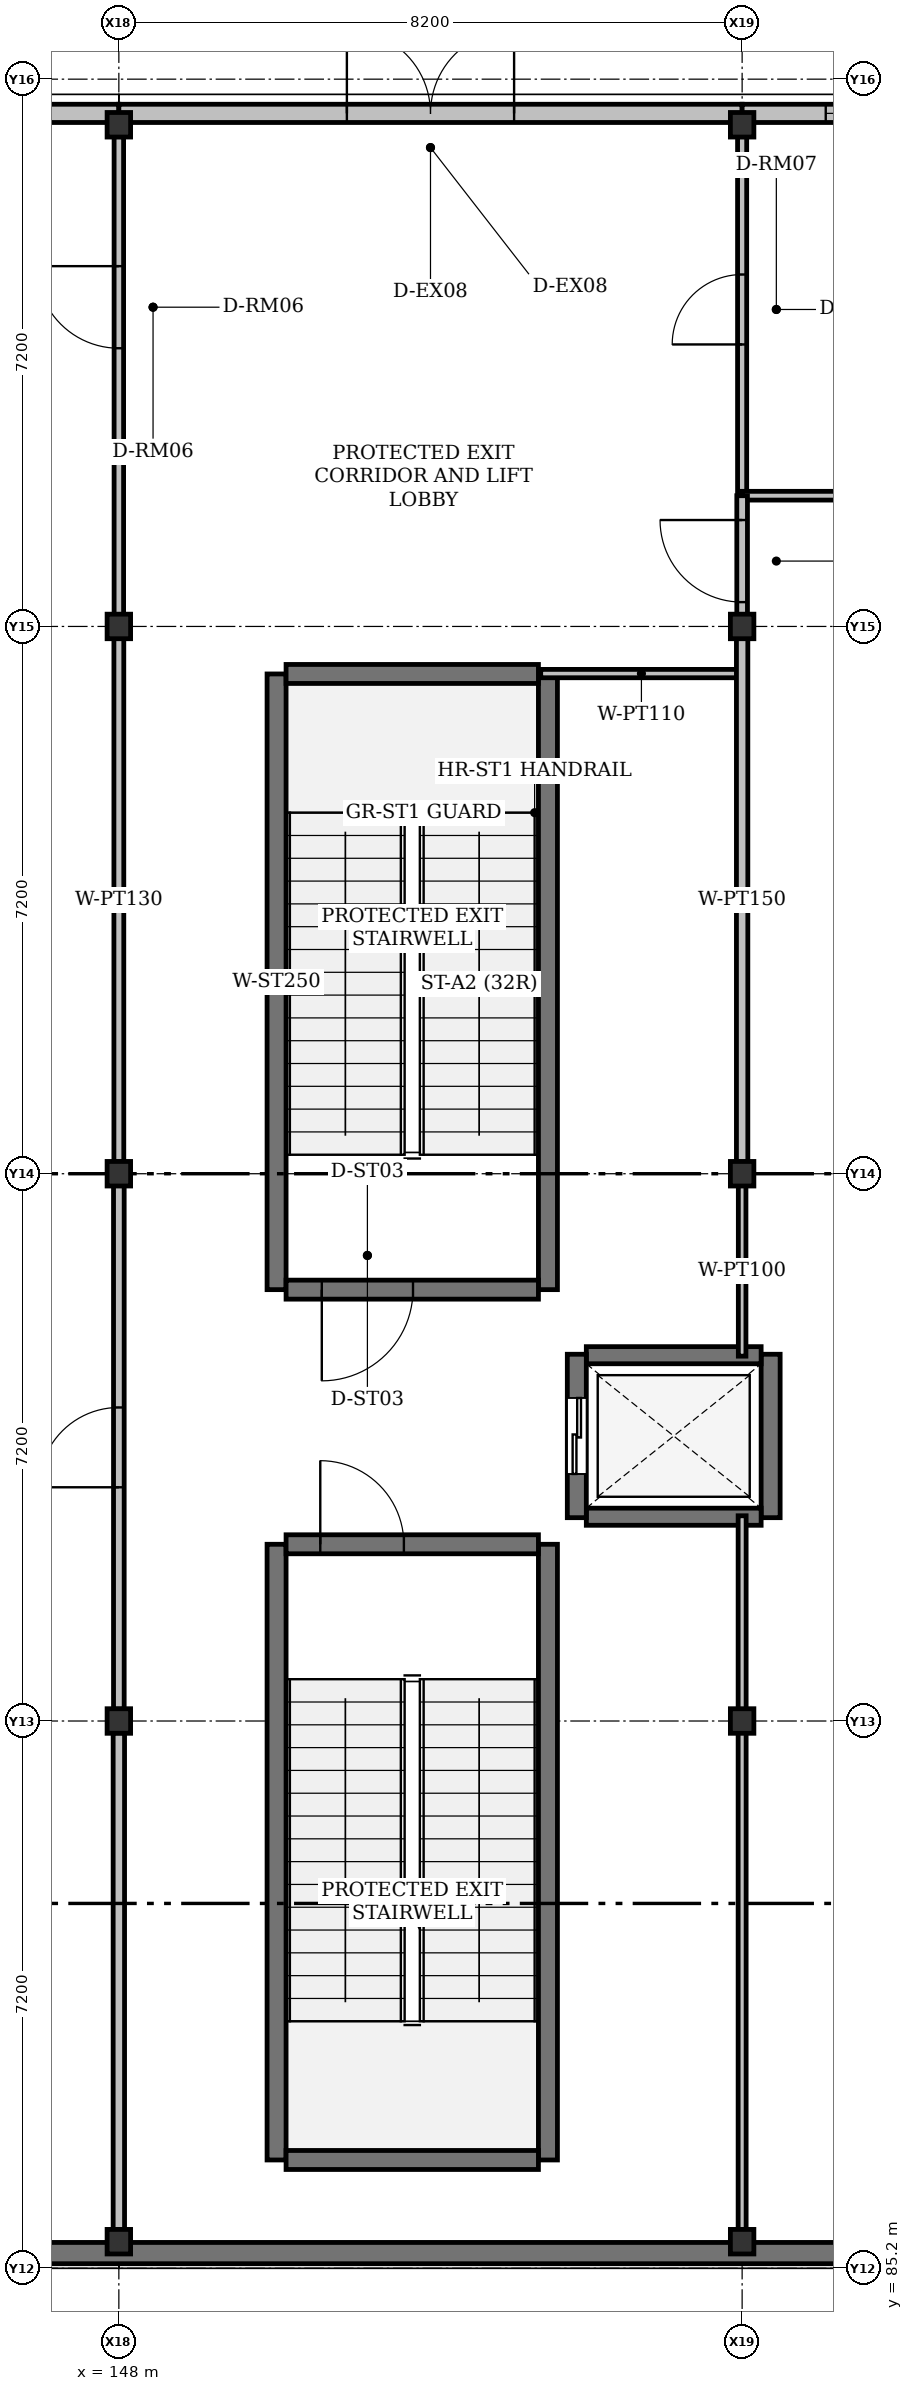
"""IFC4 building model, lengths in metres.
Left out: names, types, materials, properties, quantities, classifications, styles, units other than length and angle.
Written with IfcOpenShell. Run it as: python <this file> out.ifc"""

import sys

from ifc_helpers import new_model, si_unit, direction, frame, frame_2d, origin, origin_2d, place, context, subcontext, project, spatial, rectangle, i_section, extrude, element, fill, save


model = new_model("IFC4")
c1 = context("Model", 3, precision=1e-05, world=origin(), true_north=direction((0.0, 1.0)))
c2 = subcontext(c1, "Body", "Model", "MODEL_VIEW")
j1 = project(units=[si_unit("LENGTHUNIT", "METRE"), si_unit("PLANEANGLEUNIT", "RADIAN")], contexts=[c1])
p1 = place(None, origin())
s1 = spatial("IfcSite", under=j1, at=p1, CompositionType="ELEMENT")
p2 = place(p1, origin())
s2 = spatial("IfcBuilding", under=s1, at=p2, CompositionType="ELEMENT")
p3 = place(p2, origin())
s3 = spatial("IfcBuildingStorey", under=s2, at=p3, CompositionType="ELEMENT", Elevation=0.0)
for number, where, z_axis, x_axis in (
    (1, (148.0, 85.55, 0.0), (0.0, 0.0, 1.0), (1.0, 0.0, 0.0)),
    (2, (148.0, 92.4, 0.0), (0.0, 0.0, 1.0), (1.0, 0.0, 0.0)),
    (3, (148.0, 99.6, 0.0), (0.0, 0.0, 1.0), (1.0, 0.0, 0.0)),
    (4, (148.0, 106.8, 0.0), (0.0, 0.0, 1.0), (1.0, 0.0, 0.0)),
    (5, (148.0, 113.4, 0.0), (0.0, 0.0, 1.0), (1.0, 0.0, 0.0)),
    (6, (156.2, 85.55, 0.0), (0.0, 0.0, 1.0), (1.0, 0.0, 0.0)),
    (7, (156.2, 92.4, 0.0), (0.0, 0.0, 1.0), (1.0, 0.0, 0.0)),
    (8, (156.2, 99.6, 0.0), (0.0, 0.0, 1.0), (1.0, 0.0, 0.0)),
    (9, (156.2, 106.8, 0.0), (0.0, 0.0, 1.0), (1.0, 0.0, 0.0)),
    (10, (156.2, 113.4, 0.0), (0.0, 0.0, 1.0), (1.0, 0.0, 0.0)),
):
    element("IfcColumn", number, at=place(p3, frame(where, z_axis=z_axis, x_axis=x_axis)), inside=s3, PredefinedType="COLUMN", context=c2, shape_type="SweptSolid", body=[
        extrude(i_section(OverallWidth=0.309, OverallDepth=0.323, WebThickness=0.014, FlangeThickness=0.023, FilletRadius=0.015, at=origin_2d()), origin(), (0.0, 0.0, 1.0), 5.4),
    ])
p4 = place(p3, frame((163.85, 85.4, 0.0), z_axis=(0.0, 0.0, 1.0), x_axis=(-1.0, 0.0, 0.0)))
e11 = element("IfcWall", 11, at=p4, inside=s3, PredefinedType="SOLIDWALL", context=c2, shape_type="SweptSolid", body=[
    extrude(rectangle(XDim=40.25, YDim=0.28, at=frame_2d((20.125, 0.0))), origin(), (0.0, 0.0, 1.0), 5.19),
])
p5 = place(p3, frame((139.8, 113.55, 0.0), z_axis=(0.0, 0.0, 1.0), x_axis=(1.0, 0.0, 0.0)))
e12 = element("IfcWall", 12, at=p5, inside=s3, PredefinedType="SOLIDWALL", context=c2, shape_type="SweptSolid", body=[
    extrude(rectangle(XDim=8.2, YDim=0.24, at=frame_2d((4.1, 0.0))), origin(), (0.0, 0.0, 1.0), 4.7),
])
p6 = place(p5, frame((1.1, 0.0, 0.92)))
e13 = element("IfcOpeningElement", 13, at=p6, cuts=e12, PredefinedType="OPENING", context=c2, shape_type="SweptSolid", body=[
    extrude(rectangle(XDim=1.2, YDim=1.55, at=frame_2d((0.6, 0.775))), frame((0.0, 0.12, 0.0), z_axis=(0.0, -1.0, 0.0), x_axis=(1.0, 0.0, 0.0)), (0.0, 0.0, 1.0), 0.24),
])
p7 = place(p5, frame((5.3, 0.0, 0.92)))
e14 = element("IfcOpeningElement", 14, at=p7, cuts=e12, PredefinedType="OPENING", context=c2, shape_type="SweptSolid", body=[
    extrude(rectangle(XDim=1.8, YDim=1.7, at=frame_2d((0.9, 0.85))), frame((0.0, 0.12, 0.0), z_axis=(0.0, -1.0, 0.0), x_axis=(1.0, 0.0, 0.0)), (0.0, 0.0, 1.0), 0.24),
])
p8 = place(p3, frame((148.0, 113.55, 0.0), z_axis=(0.0, 0.0, 1.0), x_axis=(1.0, 0.0, 0.0)))
e15 = element("IfcWall", 15, at=p8, inside=s3, PredefinedType="SOLIDWALL", context=c2, shape_type="SweptSolid", body=[
    extrude(rectangle(XDim=8.2, YDim=0.24, at=frame_2d((4.1, 0.0))), origin(), (0.0, 0.0, 1.0), 4.7),
])
p9 = place(p8, frame((3.0, 0.0, 0.0)))
e16 = element("IfcOpeningElement", 16, at=p9, cuts=e15, PredefinedType="OPENING", context=c2, shape_type="SweptSolid", body=[
    extrude(rectangle(XDim=2.2, YDim=2.4, at=frame_2d((1.1, 1.2))), frame((0.0, 0.12, 0.0), z_axis=(0.0, -1.0, 0.0), x_axis=(1.0, 0.0, 0.0)), (0.0, 0.0, 1.0), 0.24),
])
p10 = place(p3, frame((156.2, 113.55, 0.0), z_axis=(0.0, 0.0, 1.0), x_axis=(1.0, 0.0, 0.0)))
e17 = element("IfcWall", 17, at=p10, inside=s3, PredefinedType="SOLIDWALL", context=c2, shape_type="SweptSolid", body=[
    extrude(rectangle(XDim=7.65, YDim=0.24, at=frame_2d((3.825, 0.0))), origin(), (0.0, 0.0, 1.0), 4.7),
])
p11 = place(p10, frame((1.1, 0.0, 0.92)))
e18 = element("IfcOpeningElement", 18, at=p11, cuts=e17, PredefinedType="OPENING", context=c2, shape_type="SweptSolid", body=[
    extrude(rectangle(XDim=1.8, YDim=1.55, at=frame_2d((0.9, 0.775))), frame((0.0, 0.12, 0.0), z_axis=(0.0, -1.0, 0.0), x_axis=(1.0, 0.0, 0.0)), (0.0, 0.0, 1.0), 0.24),
])
p12 = place(p10, frame((4.15, 0.0, 0.92)))
e19 = element("IfcOpeningElement", 19, at=p12, cuts=e17, PredefinedType="OPENING", context=c2, shape_type="SweptSolid", body=[
    extrude(rectangle(XDim=2.4, YDim=1.7, at=frame_2d((1.2, 0.85))), frame((0.0, 0.12, 0.0), z_axis=(0.0, -1.0, 0.0), x_axis=(1.0, 0.0, 0.0)), (0.0, 0.0, 1.0), 0.24),
])
for number, where, z_axis, x_axis in (
    (20, (150.075, 86.625, 0.0), (0.0, 0.0, 1.0), (0.0, 1.0, 0.0)),
    (21, (153.645, 86.625, 0.0), (0.0, 0.0, 1.0), (0.0, 1.0, 0.0)),
):
    element("IfcWall", number, at=place(p3, frame(where, z_axis=z_axis, x_axis=x_axis)), inside=s3, PredefinedType="SHEAR", context=c2, shape_type="SweptSolid", body=[
        extrude(rectangle(XDim=8.1, YDim=0.25, at=frame_2d((4.05, 0.0))), origin(), (0.0, 0.0, 1.0), 5.4),
    ])
p13 = place(p3, frame((150.2, 86.625, 0.0), z_axis=(0.0, 0.0, 1.0), x_axis=(1.0, 0.0, 0.0)))
e22 = element("IfcWall", 22, at=p13, inside=s3, PredefinedType="SHEAR", context=c2, shape_type="SweptSolid", body=[
    extrude(rectangle(XDim=3.32, YDim=0.25, at=frame_2d((1.66, 0.0))), origin(), (0.0, 0.0, 1.0), 5.4),
])
p14 = place(p3, frame((150.2, 94.725, 0.0), z_axis=(0.0, 0.0, 1.0), x_axis=(1.0, 0.0, 0.0)))
e23 = element("IfcWall", 23, at=p14, inside=s3, PredefinedType="SHEAR", context=c2, shape_type="SweptSolid", body=[
    extrude(rectangle(XDim=3.32, YDim=0.25, at=frame_2d((1.66, 0.0))), origin(), (0.0, 0.0, 1.0), 5.4),
])
p15 = place(p14, frame((0.45, 0.0, 0.0)))
e24 = element("IfcOpeningElement", 24, at=p15, cuts=e23, PredefinedType="OPENING", context=c2, shape_type="SweptSolid", body=[
    extrude(rectangle(XDim=1.1, YDim=2.15, at=frame_2d((0.55, 1.075))), frame((0.0, 0.125, 0.0), z_axis=(0.0, -1.0, 0.0), x_axis=(1.0, 0.0, 0.0)), (0.0, 0.0, 1.0), 0.25),
])
for number, where, z_axis, x_axis in (
    (25, (150.075, 98.075, 0.0), (0.0, 0.0, 1.0), (0.0, 1.0, 0.0)),
    (26, (153.645, 98.075, 0.0), (0.0, 0.0, 1.0), (0.0, 1.0, 0.0)),
):
    element("IfcWall", number, at=place(p3, frame(where, z_axis=z_axis, x_axis=x_axis)), inside=s3, PredefinedType="SHEAR", context=c2, shape_type="SweptSolid", body=[
        extrude(rectangle(XDim=8.1, YDim=0.25, at=frame_2d((4.05, 0.0))), origin(), (0.0, 0.0, 1.0), 5.4),
    ])
p16 = place(p3, frame((150.2, 106.175, 0.0), z_axis=(0.0, 0.0, 1.0), x_axis=(1.0, 0.0, 0.0)))
e27 = element("IfcWall", 27, at=p16, inside=s3, PredefinedType="SHEAR", context=c2, shape_type="SweptSolid", body=[
    extrude(rectangle(XDim=3.32, YDim=0.25, at=frame_2d((1.66, 0.0))), origin(), (0.0, 0.0, 1.0), 5.4),
])
p17 = place(p3, frame((153.52, 98.075, 0.0), z_axis=(0.0, 0.0, 1.0), x_axis=(-1.0, 0.0, 0.0)))
e28 = element("IfcWall", 28, at=p17, inside=s3, PredefinedType="SHEAR", context=c2, shape_type="SweptSolid", body=[
    extrude(rectangle(XDim=3.32, YDim=0.25, at=frame_2d((1.66, 0.0))), origin(), (0.0, 0.0, 1.0), 5.4),
])
p18 = place(p17, frame((1.65, 0.0, 0.0)))
e29 = element("IfcOpeningElement", 29, at=p18, cuts=e28, PredefinedType="OPENING", context=c2, shape_type="SweptSolid", body=[
    extrude(rectangle(XDim=1.2, YDim=2.2, at=frame_2d((0.6, 1.1))), frame((0.0, 0.125, 0.0), z_axis=(0.0, -1.0, 0.0), x_axis=(1.0, 0.0, 0.0)), (0.0, 0.0, 1.0), 0.25),
])
p19 = place(p3, frame((156.575, 95.075, 0.0), z_axis=(0.0, 0.0, 1.0), x_axis=(0.0, 1.0, 0.0)))
e30 = element("IfcWall", 30, at=p19, inside=s3, PredefinedType="SHEAR", context=c2, shape_type="SweptSolid", body=[
    extrude(rectangle(XDim=2.15, YDim=0.25, at=frame_2d((1.075, 0.0))), origin(), (0.0, 0.0, 1.0), 5.4),
])
for number, where, z_axis, x_axis in (
    (31, (154.15, 95.087, 0.0), (0.0, 0.0, 1.0), (1.0, 0.0, 0.0)),
    (32, (154.15, 97.212, 0.0), (0.0, 0.0, 1.0), (1.0, 0.0, 0.0)),
):
    element("IfcWall", number, at=place(p3, frame(where, z_axis=z_axis, x_axis=x_axis)), inside=s3, PredefinedType="SHEAR", context=c2, shape_type="SweptSolid", body=[
        extrude(rectangle(XDim=2.3, YDim=0.225, at=frame_2d((1.15, 0.0))), origin(), (0.0, 0.0, 1.0), 5.4),
    ])
p20 = place(p3, frame((154.025, 95.075, 0.0), z_axis=(0.0, 0.0, 1.0), x_axis=(0.0, 1.0, 0.0)))
e33 = element("IfcWall", 33, at=p20, inside=s3, PredefinedType="SHEAR", context=c2, shape_type="SweptSolid", body=[
    extrude(rectangle(XDim=2.15, YDim=0.25, at=frame_2d((1.075, 0.0))), origin(), (0.0, 0.0, 1.0), 5.4),
])
p21 = place(p20, frame((0.575, 0.0, 0.0)))
e34 = element("IfcOpeningElement", 34, at=p21, cuts=e33, PredefinedType="OPENING", context=c2, shape_type="SweptSolid", body=[
    extrude(rectangle(XDim=1.0, YDim=2.1, at=frame_2d((0.5, 1.05))), frame((0.0, 0.125, 0.0), z_axis=(0.0, -1.0, 0.0), x_axis=(1.0, 0.0, 0.0)), (0.0, 0.0, 1.0), 0.25),
])
p22 = place(p3, frame((148.0, 85.707, 0.0), z_axis=(0.0, 0.0, 1.0), x_axis=(0.0, 1.0, 0.0)))
e35 = element("IfcWall", 35, at=p22, inside=s3, PredefinedType="PARTITIONING", context=c2, shape_type="SweptSolid", body=[
    extrude(rectangle(XDim=6.537, YDim=0.15, at=frame_2d((3.269, 0.0))), origin(), (0.0, 0.0, 1.0), 4.641),
])
p23 = place(p3, frame((148.0, 92.556, 0.0), z_axis=(0.0, 0.0, 1.0), x_axis=(0.0, 1.0, 0.0)))
e36 = element("IfcWall", 36, at=p23, inside=s3, PredefinedType="PARTITIONING", context=c2, shape_type="SweptSolid", body=[
    extrude(rectangle(XDim=6.887, YDim=0.14, at=frame_2d((3.444, 0.0))), origin(), (0.0, 0.0, 1.0), 4.641),
])
p24 = place(p23, frame((2.918, 0.0, 0.0)))
e37 = element("IfcOpeningElement", 37, at=p24, cuts=e36, PredefinedType="OPENING", context=c2, shape_type="SweptSolid", body=[
    extrude(rectangle(XDim=1.05, YDim=2.1, at=frame_2d((0.525, 1.05))), frame((0.0, 0.07, 0.0), z_axis=(0.0, -1.0, 0.0), x_axis=(1.0, 0.0, 0.0)), (0.0, 0.0, 1.0), 0.14),
])
p25 = place(p3, frame((148.0, 99.757, 0.0), z_axis=(0.0, 0.0, 1.0), x_axis=(0.0, 1.0, 0.0)))
e38 = element("IfcWall", 38, at=p25, inside=s3, PredefinedType="PARTITIONING", context=c2, shape_type="SweptSolid", body=[
    extrude(rectangle(XDim=6.887, YDim=0.13, at=frame_2d((3.443, 0.0))), origin(), (0.0, 0.0, 1.0), 4.641),
])
p26 = place(p3, frame((148.0, 106.957, 0.0), z_axis=(0.0, 0.0, 1.0), x_axis=(0.0, 1.0, 0.0)))
e39 = element("IfcWall", 39, at=p26, inside=s3, PredefinedType="PARTITIONING", context=c2, shape_type="SweptSolid", body=[
    extrude(rectangle(XDim=6.287, YDim=0.125, at=frame_2d((3.144, 0.0))), origin(), (0.0, 0.0, 1.0), 4.641),
])
p27 = place(p26, frame((3.503, 0.0, 0.0)))
e40 = element("IfcOpeningElement", 40, at=p27, cuts=e39, PredefinedType="OPENING", context=c2, shape_type="SweptSolid", body=[
    extrude(rectangle(XDim=1.08, YDim=2.1, at=frame_2d((0.54, 1.05))), frame((0.0, 0.062, 0.0), z_axis=(0.0, -1.0, 0.0), x_axis=(1.0, 0.0, 0.0)), (0.0, 0.0, 1.0), 0.125),
])
p28 = place(p3, frame((156.2, 108.52, 0.0), z_axis=(0.0, 0.0, 1.0), x_axis=(0.0, 1.0, 0.0)))
e41 = element("IfcWall", 41, at=p28, inside=s3, PredefinedType="PARTITIONING", context=c2, shape_type="SweptSolid", body=[
    extrude(rectangle(XDim=4.723, YDim=0.12, at=frame_2d((2.362, 0.0))), origin(), (0.0, 0.0, 1.0), 4.641),
])
p29 = place(p28, frame((1.99, 0.0, 0.0)))
e42 = element("IfcOpeningElement", 42, at=p29, cuts=e41, PredefinedType="OPENING", context=c2, shape_type="SweptSolid", body=[
    extrude(rectangle(XDim=0.92, YDim=2.15, at=frame_2d((0.46, 1.075))), frame((0.0, 0.06, 0.0), z_axis=(0.0, -1.0, 0.0), x_axis=(1.0, 0.0, 0.0)), (0.0, 0.0, 1.0), 0.12),
])
p30 = place(p3, frame((163.9, 108.52, 0.0), z_axis=(0.0, 0.0, 1.0), x_axis=(-1.0, 0.0, 0.0)))
e43 = element("IfcWall", 43, at=p30, inside=s3, PredefinedType="PARTITIONING", context=c2, shape_type="SweptSolid", body=[
    extrude(rectangle(XDim=7.7, YDim=0.115, at=frame_2d((3.85, 0.0))), origin(), (0.0, 0.0, 1.0), 4.641),
])
p31 = place(p3, frame((153.55, 106.18, 0.0), z_axis=(0.0, 0.0, 1.0), x_axis=(1.0, 0.0, 0.0)))
e44 = element("IfcWall", 44, at=p31, inside=s3, PredefinedType="PARTITIONING", context=c2, shape_type="SweptSolid", body=[
    extrude(rectangle(XDim=2.65, YDim=0.11, at=frame_2d((1.325, 0.0))), origin(), (0.0, 0.0, 1.0), 4.641),
])
p32 = place(p3, frame((156.2, 85.707, 0.0), z_axis=(0.0, 0.0, 1.0), x_axis=(0.0, 1.0, 0.0)))
e45 = element("IfcWall", 45, at=p32, inside=s3, PredefinedType="PARTITIONING", context=c2, shape_type="SweptSolid", body=[
    extrude(rectangle(XDim=9.394, YDim=0.105, at=frame_2d((4.697, 0.0))), origin(), (0.0, 0.0, 1.0), 4.641),
])
p33 = place(p3, frame((156.2, 97.2, 0.0), z_axis=(0.0, 0.0, 1.0), x_axis=(0.0, 1.0, 0.0)))
e46 = element("IfcWall", 46, at=p33, inside=s3, PredefinedType="PARTITIONING", context=c2, shape_type="SweptSolid", body=[
    extrude(rectangle(XDim=2.244, YDim=0.1, at=frame_2d((1.122, 0.0))), origin(), (0.0, 0.0, 1.0), 5.15),
])
p34 = place(p3, frame((156.2, 99.757, 0.0), z_axis=(0.0, 0.0, 1.0), x_axis=(0.0, 1.0, 0.0)))
e47 = element("IfcWall", 47, at=p34, inside=s3, PredefinedType="PARTITIONING", context=c2, shape_type="SweptSolid", body=[
    extrude(rectangle(XDim=6.887, YDim=0.15, at=frame_2d((3.443, 0.0))), origin(), (0.0, 0.0, 1.0), 4.641),
])
p35 = place(p3, frame((156.2, 106.957, 0.0), z_axis=(0.0, 0.0, 1.0), x_axis=(0.0, 1.0, 0.0)))
e48 = element("IfcWall", 48, at=p35, inside=s3, PredefinedType="PARTITIONING", context=c2, shape_type="SweptSolid", body=[
    extrude(rectangle(XDim=1.563, YDim=0.14, at=frame_2d((0.782, 0.0))), origin(), (0.0, 0.0, 1.0), 4.641),
])
p36 = place(p35, frame((0.164, 0.0, 0.0)))
e49 = element("IfcOpeningElement", 49, at=p36, cuts=e48, PredefinedType="OPENING", context=c2, shape_type="SweptSolid", body=[
    extrude(rectangle(XDim=1.08, YDim=2.1, at=frame_2d((0.54, 1.05))), frame((0.0, 0.07, 0.0), z_axis=(0.0, -1.0, 0.0), x_axis=(1.0, 0.0, 0.0)), (0.0, 0.0, 1.0), 0.14),
])
p37 = place(p9, origin())
e50 = element("IfcDoor", 50, at=p37, inside=s3, OperationType="DOUBLE_DOOR_SINGLE_SWING", PredefinedType="DOOR", context=c2, shape_type="SweptSolid", body=[
    extrude(rectangle(XDim=2.2, YDim=2.4, at=frame_2d((1.1, 1.2))), frame((0.0, 0.025, 0.0), z_axis=(0.0, -1.0, 0.0), x_axis=(1.0, 0.0, 0.0)), (0.0, 0.0, 1.0), 0.05),
])
fill(e16, e50)
p38 = place(p11, origin())
e51 = element("IfcWindow", 51, at=p38, inside=s3, PartitioningType="DOUBLE_PANEL_VERTICAL", PredefinedType="WINDOW", context=c2, shape_type="SweptSolid", body=[
    extrude(rectangle(XDim=1.8, YDim=1.55, at=frame_2d((0.9, 0.775))), frame((0.0, 0.03, 0.0), z_axis=(0.0, -1.0, 0.0), x_axis=(1.0, 0.0, 0.0)), (0.0, 0.0, 1.0), 0.06),
])
fill(e18, e51)
p39 = place(p15, origin())
e52 = element("IfcDoor", 52, at=p39, inside=s3, OperationType="SINGLE_SWING_LEFT", PredefinedType="DOOR", context=c2, shape_type="SweptSolid", body=[
    extrude(rectangle(XDim=1.1, YDim=2.15, at=frame_2d((0.55, 1.075))), frame((0.0, 0.025, 0.0), z_axis=(0.0, -1.0, 0.0), x_axis=(1.0, 0.0, 0.0)), (0.0, 0.0, 1.0), 0.05),
])
fill(e24, e52)
p40 = place(p18, origin())
e53 = element("IfcDoor", 53, at=p40, inside=s3, OperationType="SINGLE_SWING_RIGHT", PredefinedType="DOOR", context=c2, shape_type="SweptSolid", body=[
    extrude(rectangle(XDim=1.2, YDim=2.2, at=frame_2d((0.6, 1.1))), frame((0.0, 0.025, 0.0), z_axis=(0.0, -1.0, 0.0), x_axis=(1.0, 0.0, 0.0)), (0.0, 0.0, 1.0), 0.05),
])
fill(e29, e53)
p41 = place(p21, origin())
e54 = element("IfcDoor", 54, at=p41, inside=s3, OperationType="SLIDING_TO_LEFT", PredefinedType="DOOR", context=c2, shape_type="SweptSolid", body=[
    extrude(rectangle(XDim=1.0, YDim=2.1, at=frame_2d((0.5, 1.05))), frame((0.0, 0.025, 0.0), z_axis=(0.0, -1.0, 0.0), x_axis=(1.0, 0.0, 0.0)), (0.0, 0.0, 1.0), 0.05),
])
fill(e34, e54)
p42 = place(p24, origin())
e55 = element("IfcDoor", 55, at=p42, inside=s3, OperationType="SINGLE_SWING_LEFT", PredefinedType="DOOR", context=c2, shape_type="SweptSolid", body=[
    extrude(rectangle(XDim=1.05, YDim=2.1, at=frame_2d((0.525, 1.05))), frame((0.0, 0.025, 0.0), z_axis=(0.0, -1.0, 0.0), x_axis=(1.0, 0.0, 0.0)), (0.0, 0.0, 1.0), 0.05),
])
fill(e37, e55)
p43 = place(p27, origin())
e56 = element("IfcDoor", 56, at=p43, inside=s3, OperationType="SINGLE_SWING_RIGHT", PredefinedType="DOOR", context=c2, shape_type="SweptSolid", body=[
    extrude(rectangle(XDim=1.08, YDim=2.1, at=frame_2d((0.54, 1.05))), frame((0.0, 0.025, 0.0), z_axis=(0.0, -1.0, 0.0), x_axis=(1.0, 0.0, 0.0)), (0.0, 0.0, 1.0), 0.05),
])
fill(e40, e56)
p44 = place(p29, origin())
e57 = element("IfcDoor", 57, at=p44, inside=s3, OperationType="SINGLE_SWING_LEFT", PredefinedType="DOOR", context=c2, shape_type="SweptSolid", body=[
    extrude(rectangle(XDim=0.92, YDim=2.15, at=frame_2d((0.46, 1.075))), frame((0.0, 0.025, 0.0), z_axis=(0.0, -1.0, 0.0), x_axis=(1.0, 0.0, 0.0)), (0.0, 0.0, 1.0), 0.05),
])
fill(e42, e57)
p45 = place(p36, origin())
e58 = element("IfcDoor", 58, at=p45, inside=s3, OperationType="SINGLE_SWING_RIGHT", PredefinedType="DOOR", context=c2, shape_type="SweptSolid", body=[
    extrude(rectangle(XDim=1.08, YDim=2.1, at=frame_2d((0.54, 1.05))), frame((0.0, 0.025, 0.0), z_axis=(0.0, -1.0, 0.0), x_axis=(1.0, 0.0, 0.0)), (0.0, 0.0, 1.0), 0.05),
])
fill(e49, e58)
save(model, sys.argv[1])
